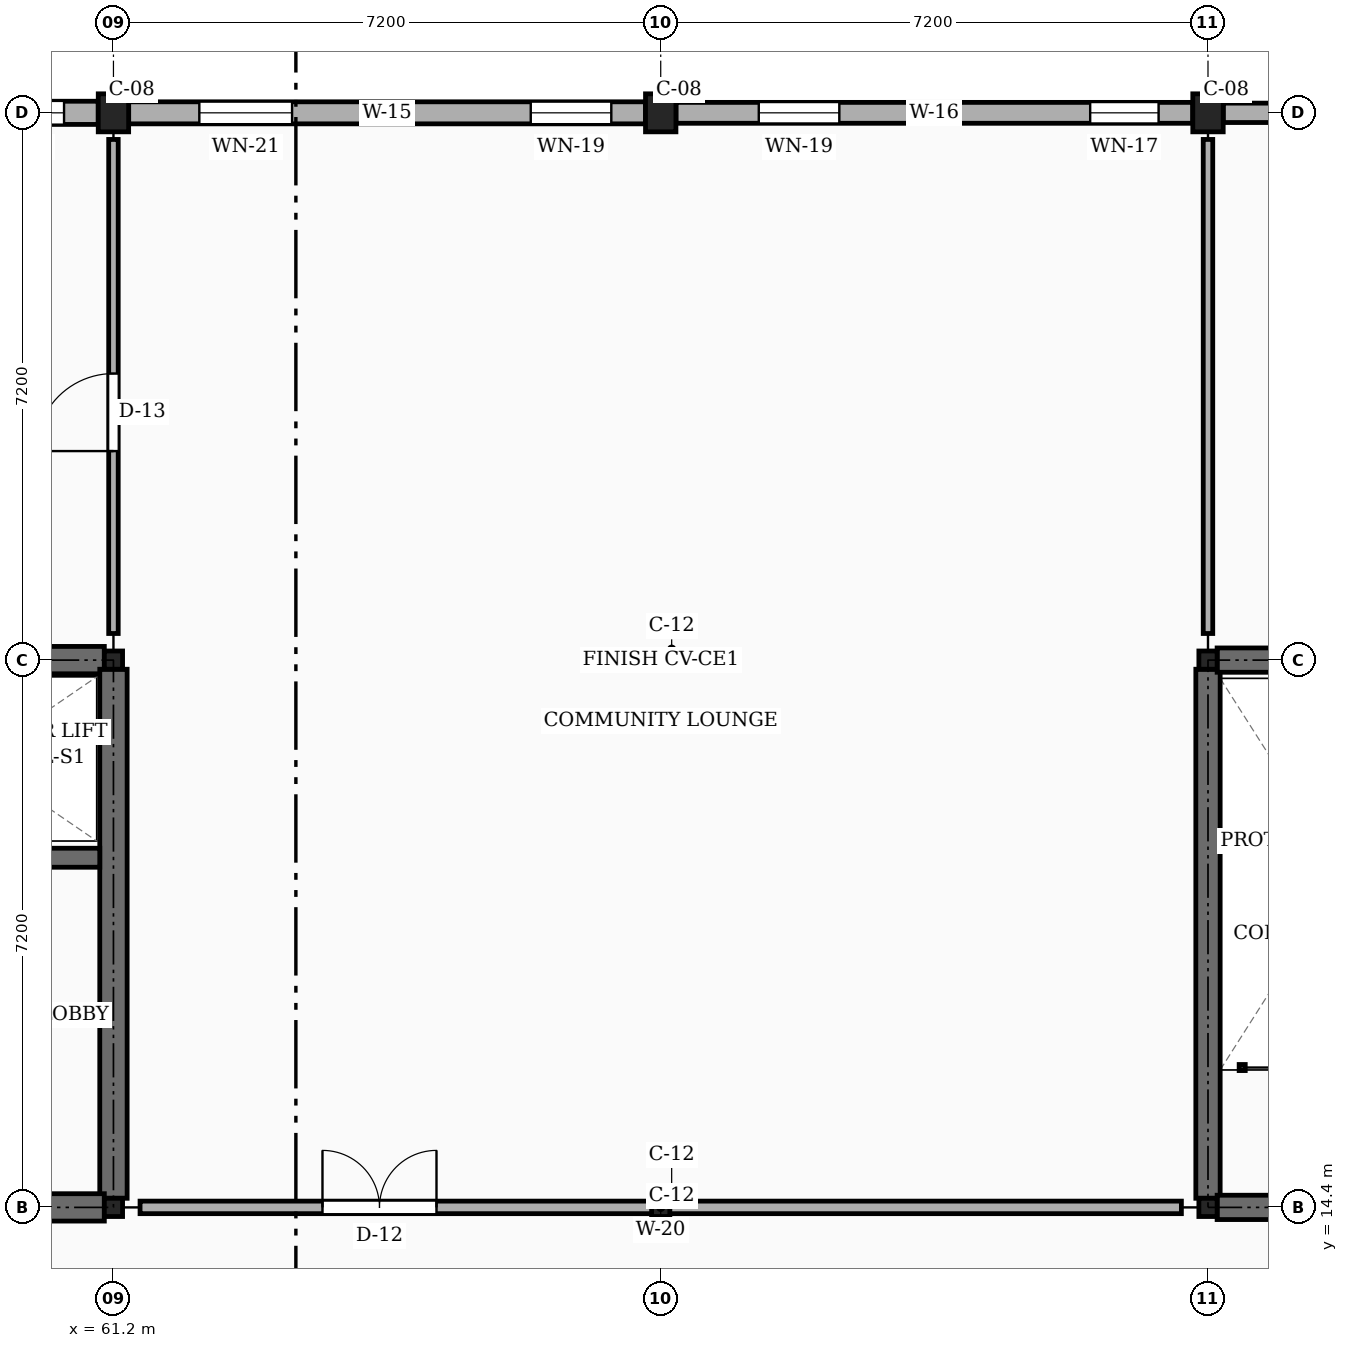
"""IFC4 building model, lengths in metres.
Left out: names, types, materials, properties, quantities, classifications, styles, units other than length and angle.
Written with IfcOpenShell. Run it as: python <this file> out.ifc"""

import sys

from ifc_helpers import new_model, si_unit, direction, frame, frame_2d, origin, origin_2d, place, context, subcontext, project, spatial, rectangle, i_section, extrude, element, fill, save


model = new_model("IFC4")
c1 = context("Model", 3, precision=1e-05, world=origin(), true_north=direction((0.0, 1.0)))
c2 = subcontext(c1, "Body", "Model", "MODEL_VIEW")
j1 = project(units=[si_unit("LENGTHUNIT", "METRE"), si_unit("PLANEANGLEUNIT", "RADIAN")], contexts=[c1])
p1 = place(None, origin())
s1 = spatial("IfcSite", under=j1, at=p1, CompositionType="ELEMENT")
p2 = place(p1, origin())
s2 = spatial("IfcBuilding", under=s1, at=p2, CompositionType="ELEMENT")
p3 = place(p2, frame((0.0, 0.0, 4.5)))
s3 = spatial("IfcBuildingStorey", under=s2, at=p3, CompositionType="ELEMENT", Elevation=4.5)
for number, where, z_axis, x_axis in (
    (1, (61.2, 14.4, 0.0), (0.0, 0.0, 1.0), (1.0, 0.0, 0.0)),
    (2, (61.2, 21.6, 0.0), (0.0, 0.0, 1.0), (1.0, 0.0, 0.0)),
):
    element("IfcColumn", number, at=place(p3, frame(where, z_axis=z_axis, x_axis=x_axis)), inside=s3, PredefinedType="COLUMN", context=c2, shape_type="SweptSolid", body=[
        extrude(i_section(OverallWidth=0.24, OverallDepth=0.24, WebThickness=0.01, FlangeThickness=0.017, FilletRadius=0.021, at=origin_2d()), origin(), (0.0, 0.0, 1.0), 3.15),
    ])
p4 = place(p3, frame((61.2, 28.8, 0.0), z_axis=(0.0, 0.0, 1.0), x_axis=(1.0, 0.0, 0.0)))
e3 = element("IfcColumn", 3, at=p4, inside=s3, PredefinedType="COLUMN", context=c2, shape_type="SweptSolid", body=[
    extrude(rectangle(XDim=0.4, YDim=0.5, at=origin_2d()), origin(), (0.0, 0.0, 1.0), 3.15),
])
for number, where, z_axis, x_axis in (
    (4, (68.4, 14.4, 0.0), (0.0, 0.0, 1.0), (1.0, 0.0, 0.0)),
    (5, (68.4, 21.6, 0.0), (0.0, 0.0, 1.0), (1.0, 0.0, 0.0)),
):
    element("IfcColumn", number, at=place(p3, frame(where, z_axis=z_axis, x_axis=x_axis)), inside=s3, PredefinedType="COLUMN", context=c2, shape_type="SweptSolid", body=[
        extrude(i_section(OverallWidth=0.24, OverallDepth=0.24, WebThickness=0.01, FlangeThickness=0.017, FilletRadius=0.021, at=origin_2d()), origin(), (0.0, 0.0, 1.0), 3.15),
    ])
p5 = place(p3, frame((68.4, 28.8, 0.0), z_axis=(0.0, 0.0, 1.0), x_axis=(1.0, 0.0, 0.0)))
e6 = element("IfcColumn", 6, at=p5, inside=s3, PredefinedType="COLUMN", context=c2, shape_type="SweptSolid", body=[
    extrude(rectangle(XDim=0.4, YDim=0.5, at=origin_2d()), origin(), (0.0, 0.0, 1.0), 3.15),
])
for number, where, z_axis, x_axis in (
    (7, (75.6, 14.4, 0.0), (0.0, 0.0, 1.0), (1.0, 0.0, 0.0)),
    (8, (75.6, 21.6, 0.0), (0.0, 0.0, 1.0), (1.0, 0.0, 0.0)),
):
    element("IfcColumn", number, at=place(p3, frame(where, z_axis=z_axis, x_axis=x_axis)), inside=s3, PredefinedType="COLUMN", context=c2, shape_type="SweptSolid", body=[
        extrude(i_section(OverallWidth=0.24, OverallDepth=0.24, WebThickness=0.01, FlangeThickness=0.017, FilletRadius=0.021, at=origin_2d()), origin(), (0.0, 0.0, 1.0), 3.15),
    ])
p6 = place(p3, frame((75.6, 28.8, 0.0), z_axis=(0.0, 0.0, 1.0), x_axis=(1.0, 0.0, 0.0)))
e9 = element("IfcColumn", 9, at=p6, inside=s3, PredefinedType="COLUMN", context=c2, shape_type="SweptSolid", body=[
    extrude(rectangle(XDim=0.4, YDim=0.5, at=origin_2d()), origin(), (0.0, 0.0, 1.0), 3.15),
])
p7 = place(p3, frame((82.6, 28.8, 0.0), z_axis=(0.0, 0.0, 1.0), x_axis=(-1.0, 0.0, 0.0)))
e10 = element("IfcWall", 10, at=p7, inside=s3, PredefinedType="SOLIDWALL", context=c2, shape_type="SweptSolid", body=[
    extrude(rectangle(XDim=6.8, YDim=0.255, at=frame_2d((3.4, 0.0))), origin(), (0.0, 0.0, 1.0), 2.34),
])
p8 = place(p7, frame((0.45, 0.0, 0.78)))
e11 = element("IfcOpeningElement", 11, at=p8, cuts=e10, PredefinedType="OPENING", context=c2, shape_type="SweptSolid", body=[
    extrude(rectangle(XDim=1.36, YDim=1.26, at=frame_2d((0.68, 0.63))), frame((0.0, 0.137, 0.0), z_axis=(0.0, -1.0, 0.0), x_axis=(1.0, 0.0, 0.0)), (0.0, 0.0, 1.0), 0.275),
])
p9 = place(p7, frame((4.65, 0.0, 0.78)))
e12 = element("IfcOpeningElement", 12, at=p9, cuts=e10, PredefinedType="OPENING", context=c2, shape_type="SweptSolid", body=[
    extrude(rectangle(XDim=0.9, YDim=1.36, at=frame_2d((0.45, 0.68))), frame((0.0, 0.137, 0.0), z_axis=(0.0, -1.0, 0.0), x_axis=(1.0, 0.0, 0.0)), (0.0, 0.0, 1.0), 0.275),
])
p10 = place(p3, frame((75.4, 28.8, 0.0), z_axis=(0.0, 0.0, 1.0), x_axis=(-1.0, 0.0, 0.0)))
e13 = element("IfcWall", 13, at=p10, inside=s3, PredefinedType="SOLIDWALL", context=c2, shape_type="SweptSolid", body=[
    extrude(rectangle(XDim=6.8, YDim=0.275, at=frame_2d((3.4, 0.0))), origin(), (0.0, 0.0, 1.0), 2.34),
])
p11 = place(p10, frame((0.45, 0.0, 0.78)))
e14 = element("IfcOpeningElement", 14, at=p11, cuts=e13, PredefinedType="OPENING", context=c2, shape_type="SweptSolid", body=[
    extrude(rectangle(XDim=0.9, YDim=1.36, at=frame_2d((0.45, 0.68))), frame((0.0, 0.147, 0.0), z_axis=(0.0, -1.0, 0.0), x_axis=(1.0, 0.0, 0.0)), (0.0, 0.0, 1.0), 0.295),
])
p12 = place(p10, frame((4.65, 0.0, 0.78)))
e15 = element("IfcOpeningElement", 15, at=p12, cuts=e13, PredefinedType="OPENING", context=c2, shape_type="SweptSolid", body=[
    extrude(rectangle(XDim=1.06, YDim=1.36, at=frame_2d((0.53, 0.68))), frame((0.0, 0.147, 0.0), z_axis=(0.0, -1.0, 0.0), x_axis=(1.0, 0.0, 0.0)), (0.0, 0.0, 1.0), 0.295),
])
p13 = place(p3, frame((68.2, 28.8, 0.0), z_axis=(0.0, 0.0, 1.0), x_axis=(-1.0, 0.0, 0.0)))
e16 = element("IfcWall", 16, at=p13, inside=s3, PredefinedType="SOLIDWALL", context=c2, shape_type="SweptSolid", body=[
    extrude(rectangle(XDim=6.8, YDim=0.29, at=frame_2d((3.4, 0.0))), origin(), (0.0, 0.0, 1.0), 2.34),
])
p14 = place(p13, frame((0.45, 0.0, 0.78)))
e17 = element("IfcOpeningElement", 17, at=p14, cuts=e16, PredefinedType="OPENING", context=c2, shape_type="SweptSolid", body=[
    extrude(rectangle(XDim=1.06, YDim=1.36, at=frame_2d((0.53, 0.68))), frame((0.0, 0.155, 0.0), z_axis=(0.0, -1.0, 0.0), x_axis=(1.0, 0.0, 0.0)), (0.0, 0.0, 1.0), 0.31),
])
p15 = place(p13, frame((4.65, 0.0, 0.78)))
e18 = element("IfcOpeningElement", 18, at=p15, cuts=e16, PredefinedType="OPENING", context=c2, shape_type="SweptSolid", body=[
    extrude(rectangle(XDim=1.22, YDim=1.36, at=frame_2d((0.61, 0.68))), frame((0.0, 0.155, 0.0), z_axis=(0.0, -1.0, 0.0), x_axis=(1.0, 0.0, 0.0)), (0.0, 0.0, 1.0), 0.31),
])
p16 = place(p3, frame((61.0, 28.8, 0.0), z_axis=(0.0, 0.0, 1.0), x_axis=(-1.0, 0.0, 0.0)))
e19 = element("IfcWall", 19, at=p16, inside=s3, PredefinedType="SOLIDWALL", context=c2, shape_type="SweptSolid", body=[
    extrude(rectangle(XDim=6.8, YDim=0.305, at=frame_2d((3.4, 0.0))), origin(), (0.0, 0.0, 1.0), 2.34),
])
p17 = place(p16, frame((0.45, 0.0, 0.78)))
e20 = element("IfcOpeningElement", 20, at=p17, cuts=e19, PredefinedType="OPENING", context=c2, shape_type="SweptSolid", body=[
    extrude(rectangle(XDim=1.22, YDim=1.36, at=frame_2d((0.61, 0.68))), frame((0.0, 0.163, 0.0), z_axis=(0.0, -1.0, 0.0), x_axis=(1.0, 0.0, 0.0)), (0.0, 0.0, 1.0), 0.325),
])
p18 = place(p16, frame((4.65, 0.0, 0.78)))
e21 = element("IfcOpeningElement", 21, at=p18, cuts=e19, PredefinedType="OPENING", context=c2, shape_type="SweptSolid", body=[
    extrude(rectangle(XDim=1.38, YDim=1.36, at=frame_2d((0.69, 0.68))), frame((0.0, 0.163, 0.0), z_axis=(0.0, -1.0, 0.0), x_axis=(1.0, 0.0, 0.0)), (0.0, 0.0, 1.0), 0.325),
])
for number, where, z_axis, x_axis in (
    (22, (54.12, 21.6, 0.0), (0.0, 0.0, 1.0), (1.0, 0.0, 0.0)),
    (23, (61.2, 14.52, 0.0), (0.0, 0.0, 1.0), (0.0, 1.0, 0.0)),
):
    element("IfcWall", number, at=place(p3, frame(where, z_axis=z_axis, x_axis=x_axis)), inside=s3, PredefinedType="SHEAR", context=c2, shape_type="SweptSolid", body=[
        extrude(rectangle(XDim=6.96, YDim=0.36, at=frame_2d((3.48, 0.0))), origin(), (0.0, 0.0, 1.0), 2.89),
    ])
p19 = place(p3, frame((54.12, 14.4, 0.0), z_axis=(0.0, 0.0, 1.0), x_axis=(1.0, 0.0, 0.0)))
e24 = element("IfcWall", 24, at=p19, inside=s3, PredefinedType="SHEAR", context=c2, shape_type="SweptSolid", body=[
    extrude(rectangle(XDim=6.96, YDim=0.36, at=frame_2d((3.48, 0.0))), origin(), (0.0, 0.0, 1.0), 2.89),
])
p20 = place(p19, frame((4.63, 0.0, 0.0)))
e25 = element("IfcOpeningElement", 25, at=p20, cuts=e24, PredefinedType="OPENING", context=c2, shape_type="SweptSolid", body=[
    extrude(rectangle(XDim=1.1, YDim=2.15, at=frame_2d((0.55, 1.075))), frame((0.0, 0.19, 0.0), z_axis=(0.0, -1.0, 0.0), x_axis=(1.0, 0.0, 0.0)), (0.0, 0.0, 1.0), 0.38),
])
p21 = place(p3, frame((57.725, 19.0, 0.0), z_axis=(0.0, 0.0, 1.0), x_axis=(1.0, 0.0, 0.0)))
e26 = element("IfcWall", 26, at=p21, inside=s3, PredefinedType="SHEAR", context=c2, shape_type="SweptSolid", body=[
    extrude(rectangle(XDim=3.295, YDim=0.25, at=frame_2d((1.647, 0.0))), origin(), (0.0, 0.0, 1.0), 2.89),
])
p22 = place(p21, frame((1.1, 0.0, 0.0)))
e27 = element("IfcOpeningElement", 27, at=p22, cuts=e26, PredefinedType="OPENING", context=c2, shape_type="SweptSolid", body=[
    extrude(rectangle(XDim=1.0, YDim=2.2, at=frame_2d((0.5, 1.1))), frame((0.0, 0.135, 0.0), z_axis=(0.0, -1.0, 0.0), x_axis=(1.0, 0.0, 0.0)), (0.0, 0.0, 1.0), 0.27),
])
p23 = place(p3, frame((75.6, 14.52, 0.0), z_axis=(0.0, 0.0, 1.0), x_axis=(0.0, 1.0, 0.0)))
e28 = element("IfcWall", 28, at=p23, inside=s3, PredefinedType="SHEAR", context=c2, shape_type="SweptSolid", body=[
    extrude(rectangle(XDim=6.96, YDim=0.32, at=frame_2d((3.48, 0.0))), origin(), (0.0, 0.0, 1.0), 2.89),
])
p24 = place(p3, frame((75.72, 21.6, 0.0), z_axis=(0.0, 0.0, 1.0), x_axis=(1.0, 0.0, 0.0)))
e29 = element("IfcWall", 29, at=p24, inside=s3, PredefinedType="SHEAR", context=c2, shape_type="SweptSolid", body=[
    extrude(rectangle(XDim=3.32, YDim=0.32, at=frame_2d((1.66, 0.0))), origin(), (0.0, 0.0, 1.0), 2.89),
])
p25 = place(p3, frame((75.72, 14.4, 0.0), z_axis=(0.0, 0.0, 1.0), x_axis=(1.0, 0.0, 0.0)))
e30 = element("IfcWall", 30, at=p25, inside=s3, PredefinedType="SHEAR", context=c2, shape_type="SweptSolid", body=[
    extrude(rectangle(XDim=3.32, YDim=0.32, at=frame_2d((1.66, 0.0))), origin(), (0.0, 0.0, 1.0), 2.89),
])
p26 = place(p25, frame((1.0, 0.0, 0.0)))
e31 = element("IfcOpeningElement", 31, at=p26, cuts=e30, PredefinedType="OPENING", context=c2, shape_type="SweptSolid", body=[
    extrude(rectangle(XDim=1.05, YDim=2.15, at=frame_2d((0.525, 1.075))), frame((0.0, 0.17, 0.0), z_axis=(0.0, -1.0, 0.0), x_axis=(1.0, 0.0, 0.0)), (0.0, 0.0, 1.0), 0.34),
])
p27 = place(p3, frame((61.55, 14.4, 0.0), z_axis=(0.0, 0.0, 1.0), x_axis=(1.0, 0.0, 0.0)))
e32 = element("IfcWall", 32, at=p27, inside=s3, PredefinedType="PARTITIONING", context=c2, shape_type="SweptSolid", body=[
    extrude(rectangle(XDim=13.7, YDim=0.165, at=frame_2d((6.85, 0.0))), origin(), (0.0, 0.0, 1.0), 2.29),
])
p28 = place(p27, frame((2.4, 0.0, 0.0)))
e33 = element("IfcOpeningElement", 33, at=p28, cuts=e32, PredefinedType="OPENING", context=c2, shape_type="SweptSolid", body=[
    extrude(rectangle(XDim=1.5, YDim=2.25, at=frame_2d((0.75, 1.125))), frame((0.0, 0.093, 0.0), z_axis=(0.0, -1.0, 0.0), x_axis=(1.0, 0.0, 0.0)), (0.0, 0.0, 1.0), 0.185),
])
p29 = place(p3, frame((61.2, 21.95, 0.0), z_axis=(0.0, 0.0, 1.0), x_axis=(0.0, 1.0, 0.0)))
e34 = element("IfcWall", 34, at=p29, inside=s3, PredefinedType="PARTITIONING", context=c2, shape_type="SweptSolid", body=[
    extrude(rectangle(XDim=6.5, YDim=0.125, at=frame_2d((3.25, 0.0))), origin(), (0.0, 0.0, 1.0), 2.29),
])
p30 = place(p29, frame((2.4, 0.0, 0.0)))
e35 = element("IfcOpeningElement", 35, at=p30, cuts=e34, PredefinedType="OPENING", context=c2, shape_type="SweptSolid", body=[
    extrude(rectangle(XDim=1.02, YDim=2.15, at=frame_2d((0.51, 1.075))), frame((0.0, 0.073, 0.0), z_axis=(0.0, -1.0, 0.0), x_axis=(1.0, 0.0, 0.0)), (0.0, 0.0, 1.0), 0.145),
])
p31 = place(p3, frame((75.6, 21.95, 0.0), z_axis=(0.0, 0.0, 1.0), x_axis=(0.0, 1.0, 0.0)))
e36 = element("IfcWall", 36, at=p31, inside=s3, PredefinedType="PARTITIONING", context=c2, shape_type="SweptSolid", body=[
    extrude(rectangle(XDim=6.5, YDim=0.125, at=frame_2d((3.25, 0.0))), origin(), (0.0, 0.0, 1.0), 2.29),
])
p32 = place(p11, origin())
e37 = element("IfcWindow", 37, at=p32, inside=s3, PartitioningType="SINGLE_PANEL", PredefinedType="WINDOW", context=c2, shape_type="SweptSolid", body=[
    extrude(rectangle(XDim=0.9, YDim=1.36, at=frame_2d((0.45, 0.68))), frame((0.0, 0.03, 0.0), z_axis=(0.0, -1.0, 0.0), x_axis=(1.0, 0.0, 0.0)), (0.0, 0.0, 1.0), 0.06),
])
fill(e14, e37)
p33 = place(p12, origin())
e38 = element("IfcWindow", 38, at=p33, inside=s3, PartitioningType="SINGLE_PANEL", PredefinedType="WINDOW", context=c2, shape_type="SweptSolid", body=[
    extrude(rectangle(XDim=1.06, YDim=1.36, at=frame_2d((0.53, 0.68))), frame((0.0, 0.03, 0.0), z_axis=(0.0, -1.0, 0.0), x_axis=(1.0, 0.0, 0.0)), (0.0, 0.0, 1.0), 0.06),
])
fill(e15, e38)
p34 = place(p14, origin())
e39 = element("IfcWindow", 39, at=p34, inside=s3, PartitioningType="SINGLE_PANEL", PredefinedType="WINDOW", context=c2, shape_type="SweptSolid", body=[
    extrude(rectangle(XDim=1.06, YDim=1.36, at=frame_2d((0.53, 0.68))), frame((0.0, 0.03, 0.0), z_axis=(0.0, -1.0, 0.0), x_axis=(1.0, 0.0, 0.0)), (0.0, 0.0, 1.0), 0.06),
])
fill(e17, e39)
p35 = place(p15, origin())
e40 = element("IfcWindow", 40, at=p35, inside=s3, PartitioningType="SINGLE_PANEL", PredefinedType="WINDOW", context=c2, shape_type="SweptSolid", body=[
    extrude(rectangle(XDim=1.22, YDim=1.36, at=frame_2d((0.61, 0.68))), frame((0.0, 0.03, 0.0), z_axis=(0.0, -1.0, 0.0), x_axis=(1.0, 0.0, 0.0)), (0.0, 0.0, 1.0), 0.06),
])
fill(e18, e40)
p36 = place(p17, origin())
e41 = element("IfcWindow", 41, at=p36, inside=s3, PartitioningType="SINGLE_PANEL", PredefinedType="WINDOW", context=c2, shape_type="SweptSolid", body=[
    extrude(rectangle(XDim=1.22, YDim=1.36, at=frame_2d((0.61, 0.68))), frame((0.0, 0.03, 0.0), z_axis=(0.0, -1.0, 0.0), x_axis=(1.0, 0.0, 0.0)), (0.0, 0.0, 1.0), 0.06),
])
fill(e20, e41)
p37 = place(p28, origin())
e42 = element("IfcDoor", 42, at=p37, inside=s3, OperationType="DOUBLE_DOOR_SINGLE_SWING", PredefinedType="DOOR", context=c2, shape_type="SweptSolid", body=[
    extrude(rectangle(XDim=1.5, YDim=2.25, at=frame_2d((0.75, 1.125))), frame((0.0, 0.025, 0.0), z_axis=(0.0, -1.0, 0.0), x_axis=(1.0, 0.0, 0.0)), (0.0, 0.0, 1.0), 0.05),
])
fill(e33, e42)
p38 = place(p30, origin())
e43 = element("IfcDoor", 43, at=p38, inside=s3, OperationType="SINGLE_SWING_LEFT", PredefinedType="DOOR", context=c2, shape_type="SweptSolid", body=[
    extrude(rectangle(XDim=1.02, YDim=2.15, at=frame_2d((0.51, 1.075))), frame((0.0, 0.025, 0.0), z_axis=(0.0, -1.0, 0.0), x_axis=(1.0, 0.0, 0.0)), (0.0, 0.0, 1.0), 0.05),
])
fill(e35, e43)
save(model, sys.argv[1])
